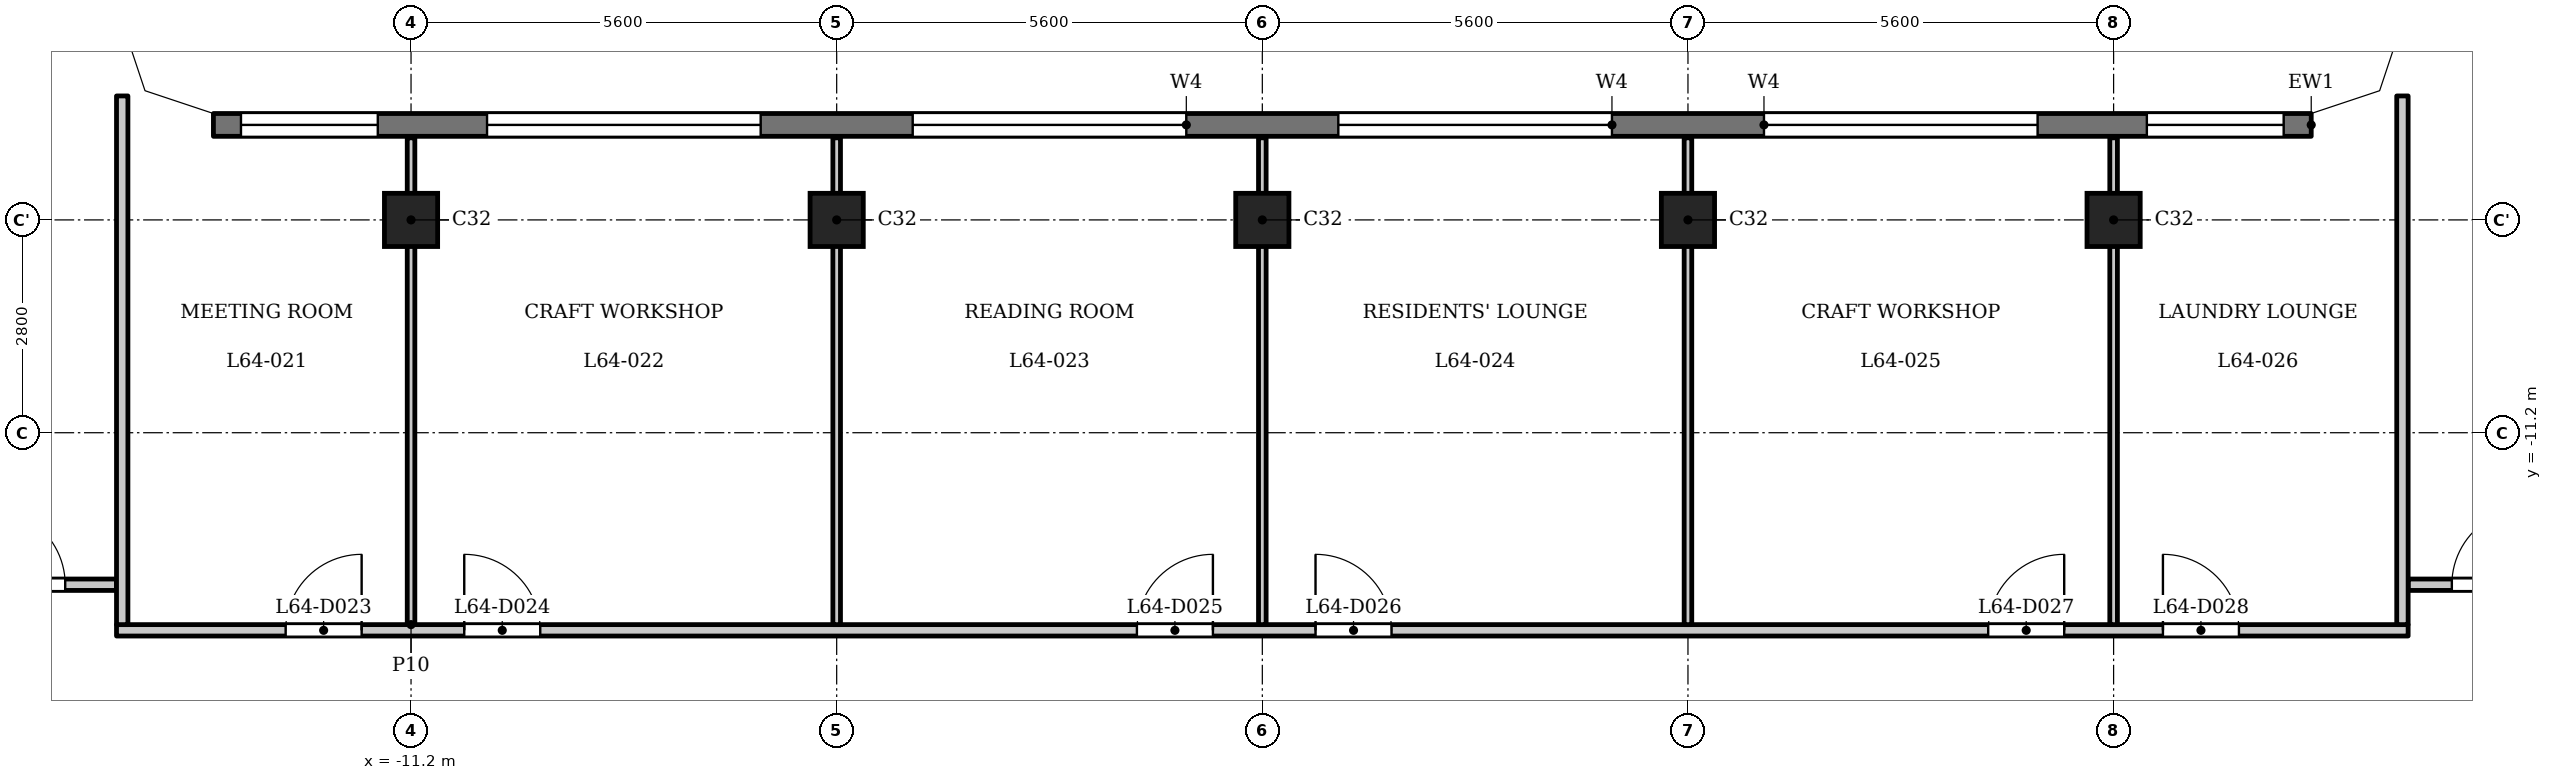
"""IFC4 building model, lengths in metres.
Left out: names, types, materials, properties, quantities, classifications, styles, units other than length and angle.
Written with IfcOpenShell. Run it as: python <this file> out.ifc"""

import sys

from ifc_helpers import new_model, si_unit, direction, frame, frame_2d, origin, origin_2d, place, context, subcontext, project, spatial, polyline, rectangle, outline, extrude, element, fill, save


model = new_model("IFC4")
c1 = context("Model", 3, precision=1e-05, world=origin(), true_north=direction((0.0, 1.0)))
c2 = subcontext(c1, "Body", "Model", "MODEL_VIEW")
j1 = project(units=[si_unit("LENGTHUNIT", "METRE"), si_unit("PLANEANGLEUNIT", "RADIAN")], contexts=[c1])
p1 = place(None, origin())
s1 = spatial("IfcSite", under=j1, at=p1, CompositionType="ELEMENT")
p2 = place(p1, origin())
s2 = spatial("IfcBuilding", under=s1, at=p2, CompositionType="ELEMENT")
p3 = place(p2, frame((0.0, 0.0, 248.7)))
s3 = spatial("IfcBuildingStorey", under=s2, at=p3, CompositionType="ELEMENT", Elevation=248.7)
for number, where, z_axis, x_axis in (
    (1, (-11.2, -8.4, 0.0), (0.0, 0.0, 1.0), (1.0, 0.0, 0.0)),
    (2, (-5.6, -8.4, 0.0), (0.0, 0.0, 1.0), (1.0, 0.0, 0.0)),
    (3, (0.0, -8.4, 0.0), (0.0, 0.0, 1.0), (1.0, 0.0, 0.0)),
    (4, (5.6, -8.4, 0.0), (0.0, 0.0, 1.0), (1.0, 0.0, 0.0)),
    (5, (11.2, -8.4, 0.0), (0.0, 0.0, 1.0), (1.0, 0.0, 0.0)),
):
    element("IfcColumn", number, at=place(p3, frame(where, z_axis=z_axis, x_axis=x_axis)), inside=s3, PredefinedType="COLUMN", context=c2, shape_type="SweptSolid", body=[
        extrude(rectangle(XDim=0.7, YDim=0.7, at=origin_2d()), origin(), (0.0, 0.0, 1.0), 3.5),
    ])
p4 = place(p3, frame((13.8, -7.15, 0.0), z_axis=(0.0, 0.0, 1.0), x_axis=(-1.0, 0.0, 0.0)))
e6 = element("IfcWall", 6, at=p4, inside=s3, PredefinedType="SOLIDWALL", context=c2, shape_type="SweptSolid", body=[
    extrude(rectangle(XDim=27.6, YDim=0.3, at=frame_2d((13.8, 0.0))), origin(), (0.0, 0.0, 1.0), 3.2),
])
p5 = place(p4, frame((0.363, 0.0, 0.9)))
e7 = element("IfcOpeningElement", 7, at=p5, cuts=e6, PredefinedType="OPENING", context=c2, shape_type="SweptSolid", body=[
    extrude(rectangle(XDim=1.8, YDim=1.25, at=frame_2d((0.9, 0.625))), frame((0.0, 0.16, 0.0), z_axis=(0.0, -1.0, 0.0), x_axis=(1.0, 0.0, 0.0)), (0.0, 0.0, 1.0), 0.32),
])
p6 = place(p4, frame((3.6, 0.0, 1.2)))
e8 = element("IfcOpeningElement", 8, at=p6, cuts=e6, PredefinedType="OPENING", context=c2, shape_type="SweptSolid", body=[
    extrude(rectangle(XDim=3.6, YDim=0.95, at=frame_2d((1.8, 0.475))), frame((0.0, 0.16, 0.0), z_axis=(0.0, -1.0, 0.0), x_axis=(1.0, 0.0, 0.0)), (0.0, 0.0, 1.0), 0.32),
])
p7 = place(p4, frame((9.2, 0.0, 1.2)))
e9 = element("IfcOpeningElement", 9, at=p7, cuts=e6, PredefinedType="OPENING", context=c2, shape_type="SweptSolid", body=[
    extrude(rectangle(XDim=3.6, YDim=0.95, at=frame_2d((1.8, 0.475))), frame((0.0, 0.16, 0.0), z_axis=(0.0, -1.0, 0.0), x_axis=(1.0, 0.0, 0.0)), (0.0, 0.0, 1.0), 0.32),
])
p8 = place(p4, frame((14.8, 0.0, 1.2)))
e10 = element("IfcOpeningElement", 10, at=p8, cuts=e6, PredefinedType="OPENING", context=c2, shape_type="SweptSolid", body=[
    extrude(rectangle(XDim=3.6, YDim=0.95, at=frame_2d((1.8, 0.475))), frame((0.0, 0.16, 0.0), z_axis=(0.0, -1.0, 0.0), x_axis=(1.0, 0.0, 0.0)), (0.0, 0.0, 1.0), 0.32),
])
p9 = place(p4, frame((20.4, 0.0, 1.2)))
e11 = element("IfcOpeningElement", 11, at=p9, cuts=e6, PredefinedType="OPENING", context=c2, shape_type="SweptSolid", body=[
    extrude(rectangle(XDim=3.6, YDim=0.95, at=frame_2d((1.8, 0.475))), frame((0.0, 0.16, 0.0), z_axis=(0.0, -1.0, 0.0), x_axis=(1.0, 0.0, 0.0)), (0.0, 0.0, 1.0), 0.32),
])
p10 = place(p4, frame((25.438, 0.0, 0.9)))
e12 = element("IfcOpeningElement", 12, at=p10, cuts=e6, PredefinedType="OPENING", context=c2, shape_type="SweptSolid", body=[
    extrude(rectangle(XDim=1.8, YDim=1.25, at=frame_2d((0.9, 0.625))), frame((0.0, 0.16, 0.0), z_axis=(0.0, -1.0, 0.0), x_axis=(1.0, 0.0, 0.0)), (0.0, 0.0, 1.0), 0.32),
])
p11 = place(p3, frame((-15.075, -13.8, 0.0), z_axis=(0.0, 0.0, 1.0), x_axis=(1.0, 0.0, 0.0)))
e13 = element("IfcWall", 13, at=p11, inside=s3, PredefinedType="PARTITIONING", context=c2, shape_type="SweptSolid", body=[
    extrude(rectangle(XDim=30.15, YDim=0.15, at=frame_2d((15.075, 0.0))), origin(), (0.0, 0.0, 1.0), 3.2),
])
p12 = place(p11, frame((2.225, 0.0, 0.0)))
e14 = element("IfcOpeningElement", 14, at=p12, cuts=e13, PredefinedType="OPENING", context=c2, shape_type="SweptSolid", body=[
    extrude(rectangle(XDim=1.0, YDim=2.1, at=frame_2d((0.5, 1.05))), frame((0.0, 0.085, 0.0), z_axis=(0.0, -1.0, 0.0), x_axis=(1.0, 0.0, 0.0)), (0.0, 0.0, 1.0), 0.17),
])
p13 = place(p11, frame((4.575, 0.0, 0.0)))
e15 = element("IfcOpeningElement", 15, at=p13, cuts=e13, PredefinedType="OPENING", context=c2, shape_type="SweptSolid", body=[
    extrude(rectangle(XDim=1.0, YDim=2.1, at=frame_2d((0.5, 1.05))), frame((0.0, 0.085, 0.0), z_axis=(0.0, -1.0, 0.0), x_axis=(1.0, 0.0, 0.0)), (0.0, 0.0, 1.0), 0.17),
])
p14 = place(p11, frame((13.425, 0.0, 0.0)))
e16 = element("IfcOpeningElement", 16, at=p14, cuts=e13, PredefinedType="OPENING", context=c2, shape_type="SweptSolid", body=[
    extrude(rectangle(XDim=1.0, YDim=2.1, at=frame_2d((0.5, 1.05))), frame((0.0, 0.085, 0.0), z_axis=(0.0, -1.0, 0.0), x_axis=(1.0, 0.0, 0.0)), (0.0, 0.0, 1.0), 0.17),
])
p15 = place(p11, frame((15.775, 0.0, 0.0)))
e17 = element("IfcOpeningElement", 17, at=p15, cuts=e13, PredefinedType="OPENING", context=c2, shape_type="SweptSolid", body=[
    extrude(rectangle(XDim=1.0, YDim=2.1, at=frame_2d((0.5, 1.05))), frame((0.0, 0.085, 0.0), z_axis=(0.0, -1.0, 0.0), x_axis=(1.0, 0.0, 0.0)), (0.0, 0.0, 1.0), 0.17),
])
p16 = place(p11, frame((24.625, 0.0, 0.0)))
e18 = element("IfcOpeningElement", 18, at=p16, cuts=e13, PredefinedType="OPENING", context=c2, shape_type="SweptSolid", body=[
    extrude(rectangle(XDim=1.0, YDim=2.1, at=frame_2d((0.5, 1.05))), frame((0.0, 0.085, 0.0), z_axis=(0.0, -1.0, 0.0), x_axis=(1.0, 0.0, 0.0)), (0.0, 0.0, 1.0), 0.17),
])
p17 = place(p11, frame((26.924, 0.0, 0.0)))
e19 = element("IfcOpeningElement", 19, at=p17, cuts=e13, PredefinedType="OPENING", context=c2, shape_type="SweptSolid", body=[
    extrude(rectangle(XDim=1.0, YDim=2.1, at=frame_2d((0.5, 1.05))), frame((0.0, 0.085, 0.0), z_axis=(0.0, -1.0, 0.0), x_axis=(1.0, 0.0, 0.0)), (0.0, 0.0, 1.0), 0.17),
])
p18 = place(p3, frame((-17.4, -13.2, 0.0), z_axis=(0.0, 0.0, 1.0), x_axis=(1.0, 0.0, 0.0)))
e20 = element("IfcWall", 20, at=p18, inside=s3, PredefinedType="PARTITIONING", context=c2, shape_type="SweptSolid", body=[
    extrude(rectangle(XDim=2.325, YDim=0.15, at=frame_2d((1.163, 0.0))), origin(), (0.0, 0.0, 1.0), 3.2),
])
p19 = place(p18, frame((0.65, 0.0, 0.0)))
e21 = element("IfcOpeningElement", 21, at=p19, cuts=e20, PredefinedType="OPENING", context=c2, shape_type="SweptSolid", body=[
    extrude(rectangle(XDim=1.0, YDim=2.1, at=frame_2d((0.5, 1.05))), frame((0.0, 0.085, 0.0), z_axis=(0.0, -1.0, 0.0), x_axis=(1.0, 0.0, 0.0)), (0.0, 0.0, 1.0), 0.17),
])
p20 = place(p3, frame((15.075, -13.2, 0.0), z_axis=(0.0, 0.0, 1.0), x_axis=(1.0, 0.0, 0.0)))
e22 = element("IfcWall", 22, at=p20, inside=s3, PredefinedType="PARTITIONING", context=c2, shape_type="SweptSolid", body=[
    extrude(rectangle(XDim=2.325, YDim=0.15, at=frame_2d((1.163, 0.0))), origin(), (0.0, 0.0, 1.0), 3.2),
])
p21 = place(p20, frame((0.575, 0.0, 0.0)))
e23 = element("IfcOpeningElement", 23, at=p21, cuts=e22, PredefinedType="OPENING", context=c2, shape_type="SweptSolid", body=[
    extrude(rectangle(XDim=1.0, YDim=2.1, at=frame_2d((0.5, 1.05))), frame((0.0, 0.085, 0.0), z_axis=(0.0, -1.0, 0.0), x_axis=(1.0, 0.0, 0.0)), (0.0, 0.0, 1.0), 0.17),
])
p22 = place(p3, frame((-15.0, -13.725, 0.0), z_axis=(0.0, 0.0, 1.0), x_axis=(0.0, 1.0, 0.0)))
e24 = element("IfcWall", 24, at=p22, inside=s3, PredefinedType="PARTITIONING", context=c2, shape_type="SweptSolid", body=[
    extrude(rectangle(XDim=6.956, YDim=0.15, at=frame_2d((3.478, 0.0))), origin(), (0.0, 0.0, 1.0), 3.2),
])
for number, where, z_axis, x_axis in (
    (25, (-11.2, -13.725, 0.0), (0.0, 0.0, 1.0), (0.0, 1.0, 0.0)),
    (26, (-5.6, -13.725, 0.0), (0.0, 0.0, 1.0), (0.0, 1.0, 0.0)),
    (27, (0.0, -13.725, 0.0), (0.0, 0.0, 1.0), (0.0, 1.0, 0.0)),
    (28, (5.6, -13.725, 0.0), (0.0, 0.0, 1.0), (0.0, 1.0, 0.0)),
    (29, (11.2, -13.725, 0.0), (0.0, 0.0, 1.0), (0.0, 1.0, 0.0)),
):
    element("IfcWall", number, at=place(p3, frame(where, z_axis=z_axis, x_axis=x_axis)), inside=s3, PredefinedType="PARTITIONING", context=c2, shape_type="SweptSolid", body=[
        extrude(rectangle(XDim=6.405, YDim=0.1, at=frame_2d((3.203, 0.0))), origin(), (0.0, 0.0, 1.0), 3.2),
    ])
p23 = place(p3, frame((15.0, -13.725, 0.0), z_axis=(0.0, 0.0, 1.0), x_axis=(0.0, 1.0, 0.0)))
e30 = element("IfcWall", 30, at=p23, inside=s3, PredefinedType="PARTITIONING", context=c2, shape_type="SweptSolid", body=[
    extrude(rectangle(XDim=6.956, YDim=0.15, at=frame_2d((3.478, 0.0))), origin(), (0.0, 0.0, 1.0), 3.2),
])
p24 = place(p3, origin())
e31 = element("IfcWall", 31, at=p24, inside=s3, PredefinedType="SOLIDWALL", context=c2, shape_type="SweptSolid", body=[
    extrude(outline(polyline([(14.937, -6.937), (15.3, -5.849), (15.3, -5.8), (15.0, -5.8), (14.7, -6.7), (13.8, -7.0), (13.8, -7.3), (13.849, -7.3), (14.937, -6.937)])), origin(), (0.0, 0.0, 1.0), 3.2),
])
e32 = element("IfcWall", 32, at=p24, inside=s3, PredefinedType="SOLIDWALL", context=c2, shape_type="SweptSolid", body=[
    extrude(outline(polyline([(-14.937, -6.937), (-13.849, -7.3), (-13.8, -7.3), (-13.8, -7.0), (-14.7, -6.7), (-15.0, -5.8), (-15.3, -5.8), (-15.3, -5.849), (-14.937, -6.937)])), origin(), (0.0, 0.0, 1.0), 3.2),
])
p25 = place(p19, origin())
e33 = element("IfcDoor", 33, at=p25, inside=s3, OperationType="SINGLE_SWING_RIGHT", PredefinedType="DOOR", context=c2, shape_type="SweptSolid", body=[
    extrude(rectangle(XDim=1.0, YDim=2.1, at=frame_2d((0.5, 1.05))), frame((0.0, 0.025, 0.0), z_axis=(0.0, -1.0, 0.0), x_axis=(1.0, 0.0, 0.0)), (0.0, 0.0, 1.0), 0.05),
])
fill(e21, e33)
p26 = place(p21, origin())
e34 = element("IfcDoor", 34, at=p26, inside=s3, OperationType="SINGLE_SWING_LEFT", PredefinedType="DOOR", context=c2, shape_type="SweptSolid", body=[
    extrude(rectangle(XDim=1.0, YDim=2.1, at=frame_2d((0.5, 1.05))), frame((0.0, 0.025, 0.0), z_axis=(0.0, -1.0, 0.0), x_axis=(1.0, 0.0, 0.0)), (0.0, 0.0, 1.0), 0.05),
])
fill(e23, e34)
p27 = place(p12, origin())
e35 = element("IfcDoor", 35, at=p27, inside=s3, OperationType="SINGLE_SWING_LEFT", PredefinedType="DOOR", context=c2, shape_type="SweptSolid", body=[
    extrude(rectangle(XDim=1.0, YDim=2.1, at=frame_2d((0.5, 1.05))), frame((0.0, 0.025, 0.0), z_axis=(0.0, -1.0, 0.0), x_axis=(1.0, 0.0, 0.0)), (0.0, 0.0, 1.0), 0.05),
])
fill(e14, e35)
p28 = place(p13, origin())
e36 = element("IfcDoor", 36, at=p28, inside=s3, OperationType="SINGLE_SWING_RIGHT", PredefinedType="DOOR", context=c2, shape_type="SweptSolid", body=[
    extrude(rectangle(XDim=1.0, YDim=2.1, at=frame_2d((0.5, 1.05))), frame((0.0, 0.025, 0.0), z_axis=(0.0, -1.0, 0.0), x_axis=(1.0, 0.0, 0.0)), (0.0, 0.0, 1.0), 0.05),
])
fill(e15, e36)
p29 = place(p14, origin())
e37 = element("IfcDoor", 37, at=p29, inside=s3, OperationType="SINGLE_SWING_LEFT", PredefinedType="DOOR", context=c2, shape_type="SweptSolid", body=[
    extrude(rectangle(XDim=1.0, YDim=2.1, at=frame_2d((0.5, 1.05))), frame((0.0, 0.025, 0.0), z_axis=(0.0, -1.0, 0.0), x_axis=(1.0, 0.0, 0.0)), (0.0, 0.0, 1.0), 0.05),
])
fill(e16, e37)
p30 = place(p15, origin())
e38 = element("IfcDoor", 38, at=p30, inside=s3, OperationType="SINGLE_SWING_RIGHT", PredefinedType="DOOR", context=c2, shape_type="SweptSolid", body=[
    extrude(rectangle(XDim=1.0, YDim=2.1, at=frame_2d((0.5, 1.05))), frame((0.0, 0.025, 0.0), z_axis=(0.0, -1.0, 0.0), x_axis=(1.0, 0.0, 0.0)), (0.0, 0.0, 1.0), 0.05),
])
fill(e17, e38)
p31 = place(p16, origin())
e39 = element("IfcDoor", 39, at=p31, inside=s3, OperationType="SINGLE_SWING_LEFT", PredefinedType="DOOR", context=c2, shape_type="SweptSolid", body=[
    extrude(rectangle(XDim=1.0, YDim=2.1, at=frame_2d((0.5, 1.05))), frame((0.0, 0.025, 0.0), z_axis=(0.0, -1.0, 0.0), x_axis=(1.0, 0.0, 0.0)), (0.0, 0.0, 1.0), 0.05),
])
fill(e18, e39)
p32 = place(p17, origin())
e40 = element("IfcDoor", 40, at=p32, inside=s3, OperationType="SINGLE_SWING_RIGHT", PredefinedType="DOOR", context=c2, shape_type="SweptSolid", body=[
    extrude(rectangle(XDim=1.0, YDim=2.1, at=frame_2d((0.5, 1.05))), frame((0.0, 0.025, 0.0), z_axis=(0.0, -1.0, 0.0), x_axis=(1.0, 0.0, 0.0)), (0.0, 0.0, 1.0), 0.05),
])
fill(e19, e40)
p33 = place(p5, origin())
e41 = element("IfcWindow", 41, at=p33, inside=s3, PartitioningType="SINGLE_PANEL", PredefinedType="WINDOW", context=c2, shape_type="SweptSolid", body=[
    extrude(rectangle(XDim=1.8, YDim=1.25, at=frame_2d((0.9, 0.625))), frame((0.0, 0.03, 0.0), z_axis=(0.0, -1.0, 0.0), x_axis=(1.0, 0.0, 0.0)), (0.0, 0.0, 1.0), 0.06),
])
fill(e7, e41)
p34 = place(p6, origin())
e42 = element("IfcWindow", 42, at=p34, inside=s3, PartitioningType="SINGLE_PANEL", PredefinedType="WINDOW", context=c2, shape_type="SweptSolid", body=[
    extrude(rectangle(XDim=3.6, YDim=0.95, at=frame_2d((1.8, 0.475))), frame((0.0, 0.03, 0.0), z_axis=(0.0, -1.0, 0.0), x_axis=(1.0, 0.0, 0.0)), (0.0, 0.0, 1.0), 0.06),
])
fill(e8, e42)
p35 = place(p7, origin())
e43 = element("IfcWindow", 43, at=p35, inside=s3, PartitioningType="SINGLE_PANEL", PredefinedType="WINDOW", context=c2, shape_type="SweptSolid", body=[
    extrude(rectangle(XDim=3.6, YDim=0.95, at=frame_2d((1.8, 0.475))), frame((0.0, 0.03, 0.0), z_axis=(0.0, -1.0, 0.0), x_axis=(1.0, 0.0, 0.0)), (0.0, 0.0, 1.0), 0.06),
])
fill(e9, e43)
p36 = place(p8, origin())
e44 = element("IfcWindow", 44, at=p36, inside=s3, PartitioningType="SINGLE_PANEL", PredefinedType="WINDOW", context=c2, shape_type="SweptSolid", body=[
    extrude(rectangle(XDim=3.6, YDim=0.95, at=frame_2d((1.8, 0.475))), frame((0.0, 0.03, 0.0), z_axis=(0.0, -1.0, 0.0), x_axis=(1.0, 0.0, 0.0)), (0.0, 0.0, 1.0), 0.06),
])
fill(e10, e44)
p37 = place(p9, origin())
e45 = element("IfcWindow", 45, at=p37, inside=s3, PartitioningType="SINGLE_PANEL", PredefinedType="WINDOW", context=c2, shape_type="SweptSolid", body=[
    extrude(rectangle(XDim=3.6, YDim=0.95, at=frame_2d((1.8, 0.475))), frame((0.0, 0.03, 0.0), z_axis=(0.0, -1.0, 0.0), x_axis=(1.0, 0.0, 0.0)), (0.0, 0.0, 1.0), 0.06),
])
fill(e11, e45)
p38 = place(p10, origin())
e46 = element("IfcWindow", 46, at=p38, inside=s3, PartitioningType="SINGLE_PANEL", PredefinedType="WINDOW", context=c2, shape_type="SweptSolid", body=[
    extrude(rectangle(XDim=1.8, YDim=1.25, at=frame_2d((0.9, 0.625))), frame((0.0, 0.03, 0.0), z_axis=(0.0, -1.0, 0.0), x_axis=(1.0, 0.0, 0.0)), (0.0, 0.0, 1.0), 0.06),
])
fill(e12, e46)
save(model, sys.argv[1])
